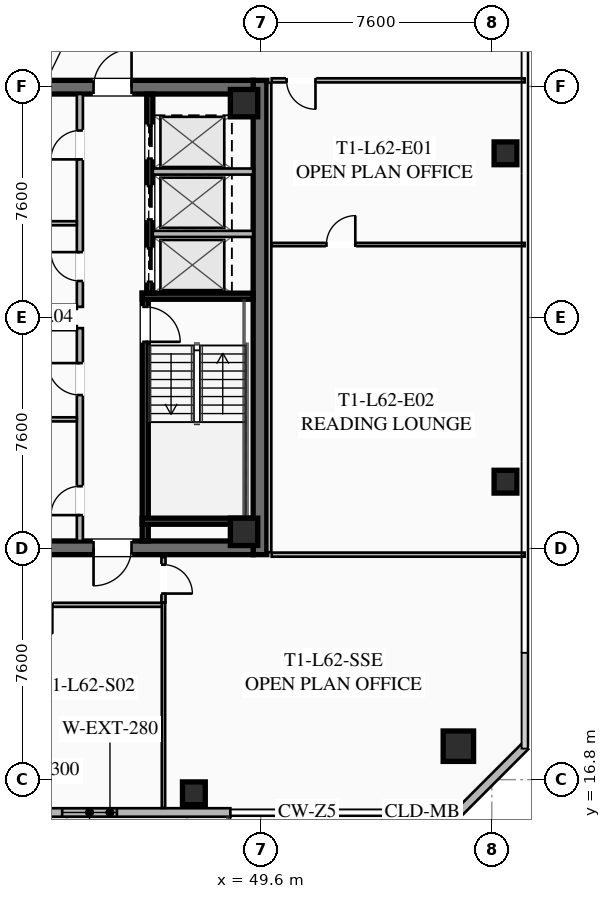
"""IFC4 building model, lengths in metres.
Left out: names, types, materials, properties, quantities, classifications, styles, units other than length and angle.
Written with IfcOpenShell. Run it as: python <this file> out.ifc"""

import sys

from ifc_helpers import new_model, si_unit, direction, frame, frame_2d, origin, origin_2d, place, context, subcontext, project, spatial, rectangle, hollow_rectangle, extrude, element, fill, save


model = new_model("IFC4")
c1 = context("Model", 3, precision=1e-05, world=origin(), true_north=direction((0.0, 1.0)))
c2 = subcontext(c1, "Body", "Model", "MODEL_VIEW")
j1 = project(units=[si_unit("LENGTHUNIT", "METRE"), si_unit("PLANEANGLEUNIT", "RADIAN")], contexts=[c1])
p1 = place(None, origin())
s1 = spatial("IfcSite", under=j1, at=p1, CompositionType="ELEMENT")
p2 = place(p1, origin())
s2 = spatial("IfcBuilding", under=s1, at=p2, CompositionType="ELEMENT")
p3 = place(p2, frame((0.0, 0.0, 229.05)))
s3 = spatial("IfcBuildingStorey", under=s2, at=p3, CompositionType="ELEMENT", Elevation=229.05)
p4 = place(p3, frame((49.575, 39.8, 0.0), z_axis=(0.0, 0.0, 1.0), x_axis=(0.0, -1.0, 0.0)))
e1 = element("IfcWall", 1, at=p4, inside=s3, PredefinedType="SHEAR", context=c2, shape_type="SweptSolid", body=[
    extrude(rectangle(XDim=15.6, YDim=0.45, at=frame_2d((7.8, 0.0))), origin(), (0.0, 0.0, 1.0), 3.55),
])
p5 = place(p3, frame((49.35, 24.425, 0.0), z_axis=(0.0, 0.0, 1.0), x_axis=(-1.0, 0.0, 0.0)))
e2 = element("IfcWall", 2, at=p5, inside=s3, PredefinedType="SHEAR", context=c2, shape_type="SweptSolid", body=[
    extrude(rectangle(XDim=14.7, YDim=0.45, at=frame_2d((7.35, 0.0))), origin(), (0.0, 0.0, 1.0), 3.55),
])
p6 = place(p5, frame((9.05, 0.0, 0.0)))
e3 = element("IfcOpeningElement", 3, at=p6, cuts=e2, PredefinedType="OPENING", context=c2, shape_type="SweptSolid", body=[
    extrude(rectangle(XDim=1.25, YDim=2.25, at=frame_2d((0.625, 1.125))), frame((0.0, 0.235, 0.0), z_axis=(0.0, -1.0, 0.0), x_axis=(1.0, 0.0, 0.0)), (0.0, 0.0, 1.0), 0.47),
])
p7 = place(p5, frame((4.0, 0.0, 0.0)))
e4 = element("IfcOpeningElement", 4, at=p7, cuts=e2, PredefinedType="OPENING", context=c2, shape_type="SweptSolid", body=[
    extrude(rectangle(XDim=1.25, YDim=2.25, at=frame_2d((0.625, 1.125))), frame((0.0, 0.235, 0.0), z_axis=(0.0, -1.0, 0.0), x_axis=(1.0, 0.0, 0.0)), (0.0, 0.0, 1.0), 0.47),
])
p8 = place(p3, frame((34.65, 39.575, 0.0), z_axis=(0.0, 0.0, 1.0), x_axis=(1.0, 0.0, 0.0)))
e5 = element("IfcWall", 5, at=p8, inside=s3, PredefinedType="SHEAR", context=c2, shape_type="SweptSolid", body=[
    extrude(rectangle(XDim=14.7, YDim=0.45, at=frame_2d((7.35, 0.0))), origin(), (0.0, 0.0, 1.0), 3.55),
])
p9 = place(p8, frame((4.4, 0.0, 0.0)))
e6 = element("IfcOpeningElement", 6, at=p9, cuts=e5, PredefinedType="OPENING", context=c2, shape_type="SweptSolid", body=[
    extrude(rectangle(XDim=1.25, YDim=2.25, at=frame_2d((0.625, 1.125))), frame((0.0, 0.235, 0.0), z_axis=(0.0, -1.0, 0.0), x_axis=(1.0, 0.0, 0.0)), (0.0, 0.0, 1.0), 0.47),
])
p10 = place(p8, frame((9.45, 0.0, 0.0)))
e7 = element("IfcOpeningElement", 7, at=p10, cuts=e5, PredefinedType="OPENING", context=c2, shape_type="SweptSolid", body=[
    extrude(rectangle(XDim=1.25, YDim=2.25, at=frame_2d((0.625, 1.125))), frame((0.0, 0.235, 0.0), z_axis=(0.0, -1.0, 0.0), x_axis=(1.0, 0.0, 0.0)), (0.0, 0.0, 1.0), 0.47),
])
for number, where, z_axis, x_axis in (
    (8, (49.05, 24.95, 0.0), (0.0, 0.0, 1.0), (1.0, 0.0, 0.0)),
    (9, (49.05, 39.05, 0.0), (0.0, 0.0, 1.0), (1.0, 0.0, 0.0)),
):
    element("IfcColumn", number, at=place(p3, frame(where, z_axis=z_axis, x_axis=x_axis)), inside=s3, PredefinedType="COLUMN", context=c2, shape_type="SweptSolid", body=[
        extrude(hollow_rectangle(XDim=0.9, YDim=0.9, WallThickness=0.04, at=origin_2d()), origin(), (0.0, 0.0, 1.0), 3.37),
    ])
p11 = place(p3, frame((56.1, 17.9, 0.0), z_axis=(0.0, 0.0, 1.0), x_axis=(1.0, 0.0, 0.0)))
e10 = element("IfcColumn", 10, at=p11, inside=s3, PredefinedType="COLUMN", context=c2, shape_type="SweptSolid", body=[
    extrude(hollow_rectangle(XDim=1.0, YDim=1.0, WallThickness=0.04, at=origin_2d()), origin(), (0.0, 0.0, 1.0), 3.37),
])
for number, where, z_axis, x_axis in (
    (11, (47.4, 16.35, 0.0), (0.0, 0.0, 1.0), (1.0, 0.0, 0.0)),
    (12, (57.65, 26.6, 0.0), (0.0, 0.0, 1.0), (1.0, 0.0, 0.0)),
    (13, (57.65, 37.4, 0.0), (0.0, 0.0, 1.0), (1.0, 0.0, 0.0)),
):
    element("IfcColumn", number, at=place(p3, frame(where, z_axis=z_axis, x_axis=x_axis)), inside=s3, PredefinedType="COLUMN", context=c2, shape_type="SweptSolid", body=[
        extrude(hollow_rectangle(XDim=0.75, YDim=0.75, WallThickness=0.032, at=origin_2d()), origin(), (0.0, 0.0, 1.0), 3.37),
    ])
p12 = place(p3, frame((48.6, 15.72, 0.0), z_axis=(0.0, 0.0, 1.0), x_axis=(-1.0, 0.0, 0.0)))
e14 = element("IfcWall", 14, at=p12, inside=s3, PredefinedType="SOLIDWALL", context=c2, shape_type="SweptSolid", body=[
    extrude(rectangle(XDim=13.2, YDim=0.28, at=frame_2d((6.6, 0.0))), origin(), (0.0, 0.0, 1.0), 3.37),
])
p13 = place(p12, frame((5.95, 0.0, 0.0)))
e15 = element("IfcOpeningElement", 15, at=p13, cuts=e14, PredefinedType="OPENING", context=c2, shape_type="SweptSolid", body=[
    extrude(rectangle(XDim=1.3, YDim=2.15, at=frame_2d((0.65, 1.075))), frame((0.0, 0.15, 0.0), z_axis=(0.0, -1.0, 0.0), x_axis=(1.0, 0.0, 0.0)), (0.0, 0.0, 1.0), 0.3),
])
p14 = place(p12, frame((3.732, 0.0, 0.85)))
e16 = element("IfcOpeningElement", 16, at=p14, cuts=e14, PredefinedType="OPENING", context=c2, shape_type="SweptSolid", body=[
    extrude(rectangle(XDim=1.8, YDim=1.92, at=frame_2d((0.9, 0.96))), frame((0.0, 0.15, 0.0), z_axis=(0.0, -1.0, 0.0), x_axis=(1.0, 0.0, 0.0)), (0.0, 0.0, 1.0), 0.3),
])
p15 = place(p3, frame((58.3, 17.9, 0.0), z_axis=(0.0, 0.0, 1.0), x_axis=(-0.707106781187, -0.707106781187, 0.0)))
e17 = element("IfcWall", 17, at=p15, inside=s3, PredefinedType="SOLIDWALL", context=c2, shape_type="SweptSolid", body=[
    extrude(rectangle(XDim=3.111, YDim=0.28, at=frame_2d((1.556, 0.0))), origin(), (0.0, 0.0, 1.0), 3.37),
])
p16 = place(p3, frame((45.8, 32.8, 0.0), z_axis=(0.0, 0.0, 1.0), x_axis=(0.0, -1.0, 0.0)))
e18 = element("IfcWall", 18, at=p16, inside=s3, PredefinedType="SHEAR", context=c2, shape_type="SweptSolid", body=[
    extrude(rectangle(XDim=8.15, YDim=0.2, at=frame_2d((4.075, 0.0))), origin(), (0.0, 0.0, 1.0), 3.37),
])
p17 = place(p16, frame((0.45, 0.0, 0.0)))
e19 = element("IfcOpeningElement", 19, at=p17, cuts=e18, PredefinedType="OPENING", context=c2, shape_type="SweptSolid", body=[
    extrude(rectangle(XDim=1.15, YDim=2.2, at=frame_2d((0.575, 1.1))), frame((0.0, 0.11, 0.0), z_axis=(0.0, -1.0, 0.0), x_axis=(1.0, 0.0, 0.0)), (0.0, 0.0, 1.0), 0.22),
])
for number, where, z_axis, x_axis in (
    (20, (45.7, 32.7, 0.0), (0.0, 0.0, 1.0), (1.0, 0.0, 0.0)),
    (21, (45.7, 25.3, 0.0), (0.0, 0.0, 1.0), (1.0, 0.0, 0.0)),
):
    element("IfcWall", number, at=place(p3, frame(where, z_axis=z_axis, x_axis=x_axis)), inside=s3, PredefinedType="SHEAR", context=c2, shape_type="SweptSolid", body=[
        extrude(rectangle(XDim=3.65, YDim=0.2, at=frame_2d((1.825, 0.0))), origin(), (0.0, 0.0, 1.0), 3.37),
    ])
p18 = place(p3, frame((45.95, 39.35, 0.0), z_axis=(0.0, 0.0, 1.0), x_axis=(0.0, -1.0, 0.0)))
e22 = element("IfcWall", 22, at=p18, inside=s3, PredefinedType="SHEAR", context=c2, shape_type="SweptSolid", body=[
    extrude(rectangle(XDim=6.55, YDim=0.2, at=frame_2d((3.275, 0.0))), origin(), (0.0, 0.0, 1.0), 3.37),
])
p19 = place(p18, frame((5.075, 0.0, 0.0)))
e23 = element("IfcOpeningElement", 23, at=p19, cuts=e22, PredefinedType="OPENING", context=c2, shape_type="SweptSolid", body=[
    extrude(rectangle(XDim=1.1, YDim=2.2, at=frame_2d((0.55, 1.1))), frame((0.0, 0.11, 0.0), z_axis=(0.0, -1.0, 0.0), x_axis=(1.0, 0.0, 0.0)), (0.0, 0.0, 1.0), 0.22),
])
p20 = place(p18, frame((3.025, 0.0, 0.0)))
e24 = element("IfcOpeningElement", 24, at=p20, cuts=e22, PredefinedType="OPENING", context=c2, shape_type="SweptSolid", body=[
    extrude(rectangle(XDim=1.1, YDim=2.2, at=frame_2d((0.55, 1.1))), frame((0.0, 0.11, 0.0), z_axis=(0.0, -1.0, 0.0), x_axis=(1.0, 0.0, 0.0)), (0.0, 0.0, 1.0), 0.22),
])
p21 = place(p18, frame((1.025, 0.0, 0.0)))
e25 = element("IfcOpeningElement", 25, at=p21, cuts=e22, PredefinedType="OPENING", context=c2, shape_type="SweptSolid", body=[
    extrude(rectangle(XDim=1.1, YDim=2.2, at=frame_2d((0.55, 1.1))), frame((0.0, 0.11, 0.0), z_axis=(0.0, -1.0, 0.0), x_axis=(1.0, 0.0, 0.0)), (0.0, 0.0, 1.0), 0.22),
])
for number, where, z_axis, x_axis in (
    (26, (46.05, 34.75, 0.0), (0.0, 0.0, 1.0), (1.0, 0.0, 0.0)),
    (27, (46.05, 36.8, 0.0), (0.0, 0.0, 1.0), (1.0, 0.0, 0.0)),
):
    element("IfcWall", number, at=place(p3, frame(where, z_axis=z_axis, x_axis=x_axis)), inside=s3, PredefinedType="SOLIDWALL", context=c2, shape_type="SweptSolid", body=[
        extrude(rectangle(XDim=3.3, YDim=0.2, at=frame_2d((1.65, 0.0))), origin(), (0.0, 0.0, 1.0), 3.37),
    ])
p22 = place(p3, frame((43.65, 24.65, 0.0), z_axis=(0.0, 0.0, 1.0), x_axis=(0.0, 1.0, 0.0)))
e28 = element("IfcWall", 28, at=p22, inside=s3, PredefinedType="SOLIDWALL", context=c2, shape_type="SweptSolid", body=[
    extrude(rectangle(XDim=7.0, YDim=0.2, at=frame_2d((3.5, 0.0))), origin(), (0.0, 0.0, 1.0), 2.513),
])
p23 = place(p22, frame((0.85, 0.0, 0.0)))
e29 = element("IfcOpeningElement", 29, at=p23, cuts=e28, PredefinedType="OPENING", context=c2, shape_type="SweptSolid", body=[
    extrude(rectangle(XDim=0.95, YDim=2.05, at=frame_2d((0.475, 1.025))), frame((0.0, 0.11, 0.0), z_axis=(0.0, -1.0, 0.0), x_axis=(1.0, 0.0, 0.0)), (0.0, 0.0, 1.0), 0.22),
])
p24 = place(p22, frame((4.8, 0.0, 0.0)))
e30 = element("IfcOpeningElement", 30, at=p24, cuts=e28, PredefinedType="OPENING", context=c2, shape_type="SweptSolid", body=[
    extrude(rectangle(XDim=1.05, YDim=2.2, at=frame_2d((0.525, 1.1))), frame((0.0, 0.11, 0.0), z_axis=(0.0, -1.0, 0.0), x_axis=(1.0, 0.0, 0.0)), (0.0, 0.0, 1.0), 0.22),
])
for number, where, z_axis, x_axis in (
    (31, (41.67, 31.65, 0.0), (0.0, 0.0, 1.0), (1.0, 0.0, 0.0)),
    (32, (41.67, 28.65, 0.0), (0.0, 0.0, 1.0), (1.0, 0.0, 0.0)),
):
    element("IfcWall", number, at=place(p3, frame(where, z_axis=z_axis, x_axis=x_axis)), inside=s3, PredefinedType="PARTITIONING", context=c2, shape_type="SweptSolid", body=[
        extrude(rectangle(XDim=1.88, YDim=0.135, at=frame_2d((0.94, 0.0))), origin(), (0.0, 0.0, 1.0), 2.513),
    ])
p25 = place(p3, frame((43.65, 32.35, 0.0), z_axis=(0.0, 0.0, 1.0), x_axis=(0.0, 1.0, 0.0)))
e33 = element("IfcWall", 33, at=p25, inside=s3, PredefinedType="SOLIDWALL", context=c2, shape_type="SweptSolid", body=[
    extrude(rectangle(XDim=7.0, YDim=0.2, at=frame_2d((3.5, 0.0))), origin(), (0.0, 0.0, 1.0), 2.513),
])
p26 = place(p25, frame((0.85, 0.0, 0.0)))
e34 = element("IfcOpeningElement", 34, at=p26, cuts=e33, PredefinedType="OPENING", context=c2, shape_type="SweptSolid", body=[
    extrude(rectangle(XDim=0.95, YDim=2.05, at=frame_2d((0.475, 1.025))), frame((0.0, 0.11, 0.0), z_axis=(0.0, -1.0, 0.0), x_axis=(1.0, 0.0, 0.0)), (0.0, 0.0, 1.0), 0.22),
])
p27 = place(p25, frame((4.85, 0.0, 0.0)))
e35 = element("IfcOpeningElement", 35, at=p27, cuts=e33, PredefinedType="OPENING", context=c2, shape_type="SweptSolid", body=[
    extrude(rectangle(XDim=0.95, YDim=2.05, at=frame_2d((0.475, 1.025))), frame((0.0, 0.11, 0.0), z_axis=(0.0, -1.0, 0.0), x_axis=(1.0, 0.0, 0.0)), (0.0, 0.0, 1.0), 0.22),
])
for number, where, z_axis, x_axis in (
    (36, (41.67, 32.35, 0.0), (0.0, 0.0, 1.0), (1.0, 0.0, 0.0)),
    (37, (41.67, 35.1, 0.0), (0.0, 0.0, 1.0), (1.0, 0.0, 0.0)),
):
    element("IfcWall", number, at=place(p3, frame(where, z_axis=z_axis, x_axis=x_axis)), inside=s3, PredefinedType="PARTITIONING", context=c2, shape_type="SweptSolid", body=[
        extrude(rectangle(XDim=1.88, YDim=0.135, at=frame_2d((0.94, 0.0))), origin(), (0.0, 0.0, 1.0), 2.513),
    ])
p28 = place(p3, frame((46.4, 22.55, 0.0), z_axis=(0.0, 0.0, 1.0), x_axis=(-1.0, 0.0, 0.0)))
e38 = element("IfcWall", 38, at=p28, inside=s3, PredefinedType="PARTITIONING", context=c2, shape_type="SweptSolid", body=[
    extrude(rectangle(XDim=18.35, YDim=0.135, at=frame_2d((9.175, 0.0))), origin(), (0.0, 0.0, 1.0), 2.513),
])
p29 = place(p28, frame((17.02, 0.0, 0.0)))
e39 = element("IfcOpeningElement", 39, at=p29, cuts=e38, PredefinedType="OPENING", context=c2, shape_type="SweptSolid", body=[
    extrude(rectangle(XDim=0.95, YDim=2.05, at=frame_2d((0.475, 1.025))), frame((0.0, 0.077, 0.0), z_axis=(0.0, -1.0, 0.0), x_axis=(1.0, 0.0, 0.0)), (0.0, 0.0, 1.0), 0.155),
])
p30 = place(p28, frame((3.655, 0.0, 0.0)))
e40 = element("IfcOpeningElement", 40, at=p30, cuts=e38, PredefinedType="OPENING", context=c2, shape_type="SweptSolid", body=[
    extrude(rectangle(XDim=0.95, YDim=2.05, at=frame_2d((0.475, 1.025))), frame((0.0, 0.077, 0.0), z_axis=(0.0, -1.0, 0.0), x_axis=(1.0, 0.0, 0.0)), (0.0, 0.0, 1.0), 0.155),
])
p31 = place(p3, frame((46.4, 24.12, 0.0), z_axis=(0.0, 0.0, 1.0), x_axis=(0.0, -1.0, 0.0)))
e41 = element("IfcWall", 41, at=p31, inside=s3, PredefinedType="PARTITIONING", context=c2, shape_type="SweptSolid", body=[
    extrude(rectangle(XDim=1.49, YDim=0.135, at=frame_2d((0.745, 0.0))), origin(), (0.0, 0.0, 1.0), 2.513),
])
p32 = place(p31, frame((0.25, 0.0, 0.0)))
e42 = element("IfcOpeningElement", 42, at=p32, cuts=e41, PredefinedType="OPENING", context=c2, shape_type="SweptSolid", body=[
    extrude(rectangle(XDim=0.95, YDim=2.05, at=frame_2d((0.475, 1.025))), frame((0.0, 0.077, 0.0), z_axis=(0.0, -1.0, 0.0), x_axis=(1.0, 0.0, 0.0)), (0.0, 0.0, 1.0), 0.155),
])
p33 = place(p3, frame((46.4, 15.87, 0.0), z_axis=(0.0, 0.0, 1.0), x_axis=(0.0, 1.0, 0.0)))
e43 = element("IfcWall", 43, at=p33, inside=s3, PredefinedType="PARTITIONING", context=c2, shape_type="SweptSolid", body=[
    extrude(rectangle(XDim=6.76, YDim=0.11, at=frame_2d((3.38, 0.0))), origin(), (0.0, 0.0, 1.0), 2.513),
])
p34 = place(p3, frame((49.88, 39.72, 0.0), z_axis=(0.0, 0.0, 1.0), x_axis=(0.0, -1.0, 0.0)))
e44 = element("IfcWall", 44, at=p34, inside=s3, PredefinedType="PARTITIONING", context=c2, shape_type="SweptSolid", body=[
    extrude(rectangle(XDim=15.44, YDim=0.135, at=frame_2d((7.72, 0.0))), origin(), (0.0, 0.0, 1.0), 2.513),
])
p35 = place(p3, frame((58.28, 39.8, 0.0), z_axis=(0.0, 0.0, 1.0), x_axis=(-1.0, 0.0, 0.0)))
e45 = element("IfcWall", 45, at=p35, inside=s3, PredefinedType="PARTITIONING", context=c2, shape_type="SweptSolid", body=[
    extrude(rectangle(XDim=8.32, YDim=0.135, at=frame_2d((4.16, 0.0))), origin(), (0.0, 0.0, 1.0), 2.513),
])
p36 = place(p35, frame((6.88, 0.0, 0.0)))
e46 = element("IfcOpeningElement", 46, at=p36, cuts=e45, PredefinedType="OPENING", context=c2, shape_type="SweptSolid", body=[
    extrude(rectangle(XDim=0.95, YDim=2.05, at=frame_2d((0.475, 1.025))), frame((0.0, 0.077, 0.0), z_axis=(0.0, -1.0, 0.0), x_axis=(1.0, 0.0, 0.0)), (0.0, 0.0, 1.0), 0.155),
])
p37 = place(p3, frame((49.96, 24.2, 0.0), z_axis=(0.0, 0.0, 1.0), x_axis=(1.0, 0.0, 0.0)))
e47 = element("IfcWall", 47, at=p37, inside=s3, PredefinedType="PARTITIONING", context=c2, shape_type="SweptSolid", body=[
    extrude(rectangle(XDim=8.32, YDim=0.135, at=frame_2d((4.16, 0.0))), origin(), (0.0, 0.0, 1.0), 2.513),
])
p38 = place(p3, frame((49.96, 34.4, 0.0), z_axis=(0.0, 0.0, 1.0), x_axis=(1.0, 0.0, 0.0)))
e48 = element("IfcWall", 48, at=p38, inside=s3, PredefinedType="PARTITIONING", context=c2, shape_type="SweptSolid", body=[
    extrude(rectangle(XDim=8.32, YDim=0.11, at=frame_2d((4.16, 0.0))), origin(), (0.0, 0.0, 1.0), 2.513),
])
p39 = place(p38, frame((1.8, 0.0, 0.0)))
e49 = element("IfcOpeningElement", 49, at=p39, cuts=e48, PredefinedType="OPENING", context=c2, shape_type="SweptSolid", body=[
    extrude(rectangle(XDim=0.95, YDim=2.05, at=frame_2d((0.475, 1.025))), frame((0.0, 0.065, 0.0), z_axis=(0.0, -1.0, 0.0), x_axis=(1.0, 0.0, 0.0)), (0.0, 0.0, 1.0), 0.13),
])
p40 = place(p14, origin())
e50 = element("IfcWindow", 50, at=p40, inside=s3, PartitioningType="SINGLE_PANEL", PredefinedType="WINDOW", context=c2, shape_type="SweptSolid", body=[
    extrude(rectangle(XDim=1.8, YDim=1.92, at=frame_2d((0.9, 0.96))), frame((0.0, 0.03, 0.0), z_axis=(0.0, -1.0, 0.0), x_axis=(1.0, 0.0, 0.0)), (0.0, 0.0, 1.0), 0.06),
])
fill(e16, e50)
p41 = place(p10, origin())
e51 = element("IfcDoor", 51, at=p41, inside=s3, OperationType="SINGLE_SWING_RIGHT", PredefinedType="DOOR", context=c2, shape_type="SweptSolid", body=[
    extrude(rectangle(XDim=1.25, YDim=2.25, at=frame_2d((0.625, 1.125))), frame((0.0, 0.025, 0.0), z_axis=(0.0, -1.0, 0.0), x_axis=(1.0, 0.0, 0.0)), (0.0, 0.0, 1.0), 0.05),
])
fill(e7, e51)
p42 = place(p7, origin())
e52 = element("IfcDoor", 52, at=p42, inside=s3, OperationType="SINGLE_SWING_RIGHT", PredefinedType="DOOR", context=c2, shape_type="SweptSolid", body=[
    extrude(rectangle(XDim=1.25, YDim=2.25, at=frame_2d((0.625, 1.125))), frame((0.0, 0.025, 0.0), z_axis=(0.0, -1.0, 0.0), x_axis=(1.0, 0.0, 0.0)), (0.0, 0.0, 1.0), 0.05),
])
fill(e4, e52)
p43 = place(p17, origin())
e53 = element("IfcDoor", 53, at=p43, inside=s3, OperationType="SINGLE_SWING_RIGHT", PredefinedType="DOOR", context=c2, shape_type="SweptSolid", body=[
    extrude(rectangle(XDim=1.15, YDim=2.2, at=frame_2d((0.575, 1.1))), frame((0.0, 0.025, 0.0), z_axis=(0.0, -1.0, 0.0), x_axis=(1.0, 0.0, 0.0)), (0.0, 0.0, 1.0), 0.05),
])
fill(e19, e53)
p44 = place(p23, origin())
e54 = element("IfcDoor", 54, at=p44, inside=s3, OperationType="SINGLE_SWING_LEFT", PredefinedType="DOOR", context=c2, shape_type="SweptSolid", body=[
    extrude(rectangle(XDim=0.95, YDim=2.05, at=frame_2d((0.475, 1.025))), frame((0.0, 0.025, 0.0), z_axis=(0.0, -1.0, 0.0), x_axis=(1.0, 0.0, 0.0)), (0.0, 0.0, 1.0), 0.05),
])
fill(e29, e54)
p45 = place(p24, origin())
e55 = element("IfcDoor", 55, at=p45, inside=s3, OperationType="SINGLE_SWING_RIGHT", PredefinedType="DOOR", context=c2, shape_type="SweptSolid", body=[
    extrude(rectangle(XDim=1.05, YDim=2.2, at=frame_2d((0.525, 1.1))), frame((0.0, 0.025, 0.0), z_axis=(0.0, -1.0, 0.0), x_axis=(1.0, 0.0, 0.0)), (0.0, 0.0, 1.0), 0.05),
])
fill(e30, e55)
p46 = place(p26, origin())
e56 = element("IfcDoor", 56, at=p46, inside=s3, OperationType="SINGLE_SWING_RIGHT", PredefinedType="DOOR", context=c2, shape_type="SweptSolid", body=[
    extrude(rectangle(XDim=0.95, YDim=2.05, at=frame_2d((0.475, 1.025))), frame((0.0, 0.025, 0.0), z_axis=(0.0, -1.0, 0.0), x_axis=(1.0, 0.0, 0.0)), (0.0, 0.0, 1.0), 0.05),
])
fill(e34, e56)
p47 = place(p27, origin())
e57 = element("IfcDoor", 57, at=p47, inside=s3, OperationType="SINGLE_SWING_LEFT", PredefinedType="DOOR", context=c2, shape_type="SweptSolid", body=[
    extrude(rectangle(XDim=0.95, YDim=2.05, at=frame_2d((0.475, 1.025))), frame((0.0, 0.025, 0.0), z_axis=(0.0, -1.0, 0.0), x_axis=(1.0, 0.0, 0.0)), (0.0, 0.0, 1.0), 0.05),
])
fill(e35, e57)
p48 = place(p32, origin())
e58 = element("IfcDoor", 58, at=p48, inside=s3, OperationType="SINGLE_SWING_RIGHT", PredefinedType="DOOR", context=c2, shape_type="SweptSolid", body=[
    extrude(rectangle(XDim=0.95, YDim=2.05, at=frame_2d((0.475, 1.025))), frame((0.0, 0.025, 0.0), z_axis=(0.0, -1.0, 0.0), x_axis=(1.0, 0.0, 0.0)), (0.0, 0.0, 1.0), 0.05),
])
fill(e42, e58)
p49 = place(p36, origin())
e59 = element("IfcDoor", 59, at=p49, inside=s3, OperationType="SINGLE_SWING_LEFT", PredefinedType="DOOR", context=c2, shape_type="SweptSolid", body=[
    extrude(rectangle(XDim=0.95, YDim=2.05, at=frame_2d((0.475, 1.025))), frame((0.0, 0.025, 0.0), z_axis=(0.0, -1.0, 0.0), x_axis=(1.0, 0.0, 0.0)), (0.0, 0.0, 1.0), 0.05),
])
fill(e46, e59)
p50 = place(p39, origin())
e60 = element("IfcDoor", 60, at=p50, inside=s3, OperationType="SINGLE_SWING_RIGHT", PredefinedType="DOOR", context=c2, shape_type="SweptSolid", body=[
    extrude(rectangle(XDim=0.95, YDim=2.05, at=frame_2d((0.475, 1.025))), frame((0.0, 0.025, 0.0), z_axis=(0.0, -1.0, 0.0), x_axis=(1.0, 0.0, 0.0)), (0.0, 0.0, 1.0), 0.05),
])
fill(e49, e60)
p51 = place(p19, origin())
e61 = element("IfcDoor", 61, at=p51, inside=s3, OperationType="SLIDING_TO_LEFT", PredefinedType="DOOR", context=c2, shape_type="SweptSolid", body=[
    extrude(rectangle(XDim=1.1, YDim=2.2, at=frame_2d((0.55, 1.1))), frame((0.0, 0.025, 0.0), z_axis=(0.0, -1.0, 0.0), x_axis=(1.0, 0.0, 0.0)), (0.0, 0.0, 1.0), 0.05),
])
fill(e23, e61)
p52 = place(p20, origin())
e62 = element("IfcDoor", 62, at=p52, inside=s3, OperationType="SLIDING_TO_LEFT", PredefinedType="DOOR", context=c2, shape_type="SweptSolid", body=[
    extrude(rectangle(XDim=1.1, YDim=2.2, at=frame_2d((0.55, 1.1))), frame((0.0, 0.025, 0.0), z_axis=(0.0, -1.0, 0.0), x_axis=(1.0, 0.0, 0.0)), (0.0, 0.0, 1.0), 0.05),
])
fill(e24, e62)
p53 = place(p21, origin())
e63 = element("IfcDoor", 63, at=p53, inside=s3, OperationType="SLIDING_TO_LEFT", PredefinedType="DOOR", context=c2, shape_type="SweptSolid", body=[
    extrude(rectangle(XDim=1.1, YDim=2.2, at=frame_2d((0.55, 1.1))), frame((0.0, 0.025, 0.0), z_axis=(0.0, -1.0, 0.0), x_axis=(1.0, 0.0, 0.0)), (0.0, 0.0, 1.0), 0.05),
])
fill(e25, e63)
save(model, sys.argv[1])
